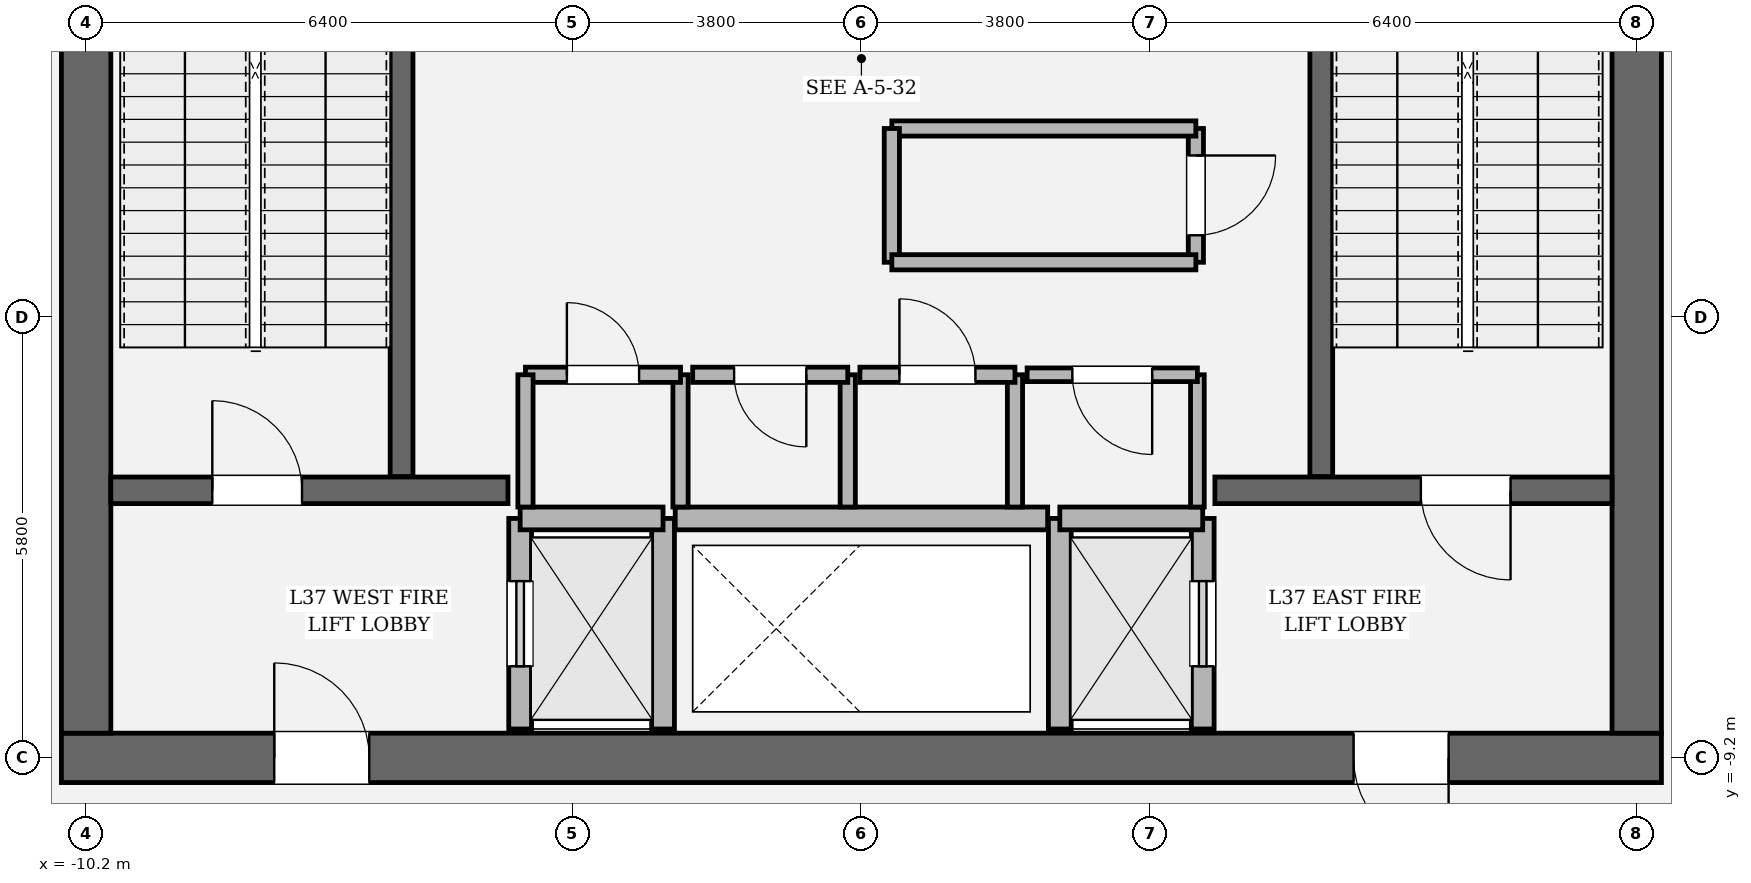
"""IFC4 building model, lengths in metres.
Left out: names, types, materials, properties, quantities, classifications, styles, units other than length and angle.
Written with IfcOpenShell. Run it as: python <this file> out.ifc"""

import sys

from ifc_helpers import new_model, si_unit, direction, frame, frame_2d, origin, place, context, subcontext, project, spatial, rectangle, extrude, element, fill, save


model = new_model("IFC4")
c1 = context("Model", 3, precision=1e-05, world=origin(), true_north=direction((0.0, 1.0)))
c2 = subcontext(c1, "Body", "Model", "MODEL_VIEW")
j1 = project(units=[si_unit("LENGTHUNIT", "METRE"), si_unit("PLANEANGLEUNIT", "RADIAN")], contexts=[c1])
p1 = place(None, origin())
s1 = spatial("IfcSite", under=j1, at=p1, CompositionType="ELEMENT")
p2 = place(p1, origin())
s2 = spatial("IfcBuilding", under=s1, at=p2, CompositionType="ELEMENT")
p3 = place(p2, frame((0.0, 0.0, 160.05)))
s3 = spatial("IfcBuildingStorey", under=s2, at=p3, CompositionType="ELEMENT", Elevation=160.05)
p4 = place(p3, frame((10.525, -9.2, 0.0), z_axis=(0.0, 0.0, 1.0), x_axis=(-1.0, 0.0, 0.0)))
e1 = element("IfcWall", 1, at=p4, inside=s3, PredefinedType="SHEAR", context=c2, shape_type="SweptSolid", body=[
    extrude(rectangle(XDim=21.05, YDim=0.65, at=frame_2d((10.525, 0.0))), origin(), (0.0, 0.0, 1.0), 4.05),
])
p5 = place(p4, frame((2.8, 0.0, 0.0)))
e2 = element("IfcOpeningElement", 2, at=p5, cuts=e1, PredefinedType="OPENING", context=c2, shape_type="SweptSolid", body=[
    extrude(rectangle(XDim=1.25, YDim=2.25, at=frame_2d((0.625, 1.125))), frame((0.0, 0.335, 0.0), z_axis=(0.0, -1.0, 0.0), x_axis=(1.0, 0.0, 0.0)), (0.0, 0.0, 1.0), 0.67),
])
p6 = place(p4, frame((17.0, 0.0, 0.0)))
e3 = element("IfcOpeningElement", 3, at=p6, cuts=e1, PredefinedType="OPENING", context=c2, shape_type="SweptSolid", body=[
    extrude(rectangle(XDim=1.25, YDim=2.25, at=frame_2d((0.625, 1.125))), frame((0.0, 0.335, 0.0), z_axis=(0.0, -1.0, 0.0), x_axis=(1.0, 0.0, 0.0)), (0.0, 0.0, 1.0), 0.67),
])
p7 = place(p3, frame((-10.2, -8.875, 0.0), z_axis=(0.0, 0.0, 1.0), x_axis=(0.0, 1.0, 0.0)))
e4 = element("IfcWall", 4, at=p7, inside=s3, PredefinedType="SHEAR", context=c2, shape_type="SweptSolid", body=[
    extrude(rectangle(XDim=17.75, YDim=0.65, at=frame_2d((8.875, 0.0))), origin(), (0.0, 0.0, 1.0), 4.05),
])
p8 = place(p7, frame((12.665, 0.0, 0.0)))
e5 = element("IfcOpeningElement", 5, at=p8, cuts=e4, PredefinedType="OPENING", context=c2, shape_type="SweptSolid", body=[
    extrude(rectangle(XDim=1.18, YDim=2.2, at=frame_2d((0.59, 1.1))), frame((0.0, 0.335, 0.0), z_axis=(0.0, -1.0, 0.0), x_axis=(1.0, 0.0, 0.0)), (0.0, 0.0, 1.0), 0.67),
])
p9 = place(p3, frame((10.2, 8.875, 0.0), z_axis=(0.0, 0.0, 1.0), x_axis=(0.0, -1.0, 0.0)))
e6 = element("IfcWall", 6, at=p9, inside=s3, PredefinedType="SHEAR", context=c2, shape_type="SweptSolid", body=[
    extrude(rectangle(XDim=17.75, YDim=0.65, at=frame_2d((8.875, 0.0))), origin(), (0.0, 0.0, 1.0), 4.05),
])
p10 = place(p9, frame((3.905, 0.0, 0.0)))
e7 = element("IfcOpeningElement", 7, at=p10, cuts=e6, PredefinedType="OPENING", context=c2, shape_type="SweptSolid", body=[
    extrude(rectangle(XDim=1.18, YDim=2.2, at=frame_2d((0.59, 1.1))), frame((0.0, 0.335, 0.0), z_axis=(0.0, -1.0, 0.0), x_axis=(1.0, 0.0, 0.0)), (0.0, 0.0, 1.0), 0.67),
])
for number, where, z_axis, x_axis in (
    (8, (-6.05, -5.5, 0.0), (0.0, 0.0, 1.0), (0.0, 1.0, 0.0)),
    (9, (6.05, 3.45, 0.0), (0.0, 0.0, 1.0), (0.0, -1.0, 0.0)),
):
    element("IfcWall", number, at=place(p3, frame(where, z_axis=z_axis, x_axis=x_axis)), inside=s3, PredefinedType="SOLIDWALL", context=c2, shape_type="SweptSolid", body=[
        extrude(rectangle(XDim=8.95, YDim=0.3, at=frame_2d((4.475, 0.0))), origin(), (0.0, 0.0, 1.0), 4.05),
    ])
p11 = place(p3, frame((-9.875, -5.68, 0.0), z_axis=(0.0, 0.0, 1.0), x_axis=(1.0, 0.0, 0.0)))
e10 = element("IfcWall", 10, at=p11, inside=s3, PredefinedType="SOLIDWALL", context=c2, shape_type="SweptSolid", body=[
    extrude(rectangle(XDim=5.225, YDim=0.35, at=frame_2d((2.613, 0.0))), origin(), (0.0, 0.0, 1.0), 4.05),
])
p12 = place(p11, frame((1.335, 0.0, 0.0)))
e11 = element("IfcOpeningElement", 11, at=p12, cuts=e10, PredefinedType="OPENING", context=c2, shape_type="SweptSolid", body=[
    extrude(rectangle(XDim=1.18, YDim=2.2, at=frame_2d((0.59, 1.1))), frame((0.0, 0.185, 0.0), z_axis=(0.0, -1.0, 0.0), x_axis=(1.0, 0.0, 0.0)), (0.0, 0.0, 1.0), 0.37),
])
p13 = place(p3, frame((4.65, -5.68, 0.0), z_axis=(0.0, 0.0, 1.0), x_axis=(1.0, 0.0, 0.0)))
e12 = element("IfcWall", 12, at=p13, inside=s3, PredefinedType="SOLIDWALL", context=c2, shape_type="SweptSolid", body=[
    extrude(rectangle(XDim=5.225, YDim=0.35, at=frame_2d((2.613, 0.0))), origin(), (0.0, 0.0, 1.0), 4.05),
])
p14 = place(p13, frame((2.71, 0.0, 0.0)))
e13 = element("IfcOpeningElement", 13, at=p14, cuts=e12, PredefinedType="OPENING", context=c2, shape_type="SweptSolid", body=[
    extrude(rectangle(XDim=1.18, YDim=2.2, at=frame_2d((0.59, 1.1))), frame((0.0, 0.185, 0.0), z_axis=(0.0, -1.0, 0.0), x_axis=(1.0, 0.0, 0.0)), (0.0, 0.0, 1.0), 0.37),
])
p15 = place(p3, frame((-4.49, -8.82, 0.0), z_axis=(0.0, 0.0, 1.0), x_axis=(0.0, 1.0, 0.0)))
e14 = element("IfcWall", 14, at=p15, inside=s3, PredefinedType="SOLIDWALL", context=c2, shape_type="SweptSolid", body=[
    extrude(rectangle(XDim=2.77, YDim=0.3, at=frame_2d((1.385, 0.0))), origin(), (0.0, 0.0, 1.0), 3.83),
])
p16 = place(p15, frame((0.825, 0.0, 0.0)))
e15 = element("IfcOpeningElement", 15, at=p16, cuts=e14, PredefinedType="OPENING", context=c2, shape_type="SweptSolid", body=[
    extrude(rectangle(XDim=1.12, YDim=2.25, at=frame_2d((0.56, 1.125))), frame((0.0, 0.16, 0.0), z_axis=(0.0, -1.0, 0.0), x_axis=(1.0, 0.0, 0.0)), (0.0, 0.0, 1.0), 0.32),
])
p17 = place(p3, frame((-2.61, -8.82, 0.0), z_axis=(0.0, 0.0, 1.0), x_axis=(0.0, 1.0, 0.0)))
e16 = element("IfcWall", 16, at=p17, inside=s3, PredefinedType="SOLIDWALL", context=c2, shape_type="SweptSolid", body=[
    extrude(rectangle(XDim=2.77, YDim=0.3, at=frame_2d((1.385, 0.0))), origin(), (0.0, 0.0, 1.0), 3.83),
])
p18 = place(p3, frame((-4.49, -6.05, 0.0), z_axis=(0.0, 0.0, 1.0), x_axis=(1.0, 0.0, 0.0)))
e17 = element("IfcWall", 17, at=p18, inside=s3, PredefinedType="SOLIDWALL", context=c2, shape_type="SweptSolid", body=[
    extrude(rectangle(XDim=1.88, YDim=0.3, at=frame_2d((0.94, 0.0))), origin(), (0.0, 0.0, 1.0), 3.83),
])
p19 = place(p3, frame((4.49, -8.82, 0.0), z_axis=(0.0, 0.0, 1.0), x_axis=(0.0, 1.0, 0.0)))
e18 = element("IfcWall", 18, at=p19, inside=s3, PredefinedType="SOLIDWALL", context=c2, shape_type="SweptSolid", body=[
    extrude(rectangle(XDim=2.77, YDim=0.3, at=frame_2d((1.385, 0.0))), origin(), (0.0, 0.0, 1.0), 3.83),
])
p20 = place(p19, frame((0.825, 0.0, 0.0)))
e19 = element("IfcOpeningElement", 19, at=p20, cuts=e18, PredefinedType="OPENING", context=c2, shape_type="SweptSolid", body=[
    extrude(rectangle(XDim=1.12, YDim=2.25, at=frame_2d((0.56, 1.125))), frame((0.0, 0.16, 0.0), z_axis=(0.0, -1.0, 0.0), x_axis=(1.0, 0.0, 0.0)), (0.0, 0.0, 1.0), 0.32),
])
p21 = place(p3, frame((2.61, -8.82, 0.0), z_axis=(0.0, 0.0, 1.0), x_axis=(0.0, 1.0, 0.0)))
e20 = element("IfcWall", 20, at=p21, inside=s3, PredefinedType="SOLIDWALL", context=c2, shape_type="SweptSolid", body=[
    extrude(rectangle(XDim=2.77, YDim=0.3, at=frame_2d((1.385, 0.0))), origin(), (0.0, 0.0, 1.0), 3.83),
])
p22 = place(p3, frame((2.61, -6.05, 0.0), z_axis=(0.0, 0.0, 1.0), x_axis=(1.0, 0.0, 0.0)))
e21 = element("IfcWall", 21, at=p22, inside=s3, PredefinedType="SOLIDWALL", context=c2, shape_type="SweptSolid", body=[
    extrude(rectangle(XDim=1.88, YDim=0.3, at=frame_2d((0.94, 0.0))), origin(), (0.0, 0.0, 1.0), 3.83),
])
p23 = place(p3, frame((-2.45, -6.05, 0.0), z_axis=(0.0, 0.0, 1.0), x_axis=(1.0, 0.0, 0.0)))
e22 = element("IfcWall", 22, at=p23, inside=s3, PredefinedType="SOLIDWALL", context=c2, shape_type="SweptSolid", body=[
    extrude(rectangle(XDim=4.9, YDim=0.3, at=frame_2d((2.45, 0.0))), origin(), (0.0, 0.0, 1.0), 3.83),
])
p24 = place(p3, frame((-2.38, -5.9, 0.0), z_axis=(0.0, 0.0, 1.0), x_axis=(0.0, 1.0, 0.0)))
e23 = element("IfcWall", 23, at=p24, inside=s3, PredefinedType="SOLIDWALL", context=c2, shape_type="SweptSolid", body=[
    extrude(rectangle(XDim=1.74, YDim=0.2, at=frame_2d((0.87, 0.0))), origin(), (0.0, 0.0, 1.0), 3.83),
])
p25 = place(p3, frame((-2.38, -4.16, 0.0), z_axis=(0.0, 0.0, 1.0), x_axis=(-1.0, 0.0, 0.0)))
e24 = element("IfcWall", 24, at=p25, inside=s3, PredefinedType="SOLIDWALL", context=c2, shape_type="SweptSolid", body=[
    extrude(rectangle(XDim=2.04, YDim=0.2, at=frame_2d((1.02, 0.0))), origin(), (0.0, 0.0, 1.0), 3.83),
])
p26 = place(p25, frame((0.545, 0.0, 0.0)))
e25 = element("IfcOpeningElement", 25, at=p26, cuts=e24, PredefinedType="OPENING", context=c2, shape_type="SweptSolid", body=[
    extrude(rectangle(XDim=0.95, YDim=2.15, at=frame_2d((0.475, 1.075))), frame((0.0, 0.11, 0.0), z_axis=(0.0, -1.0, 0.0), x_axis=(1.0, 0.0, 0.0)), (0.0, 0.0, 1.0), 0.22),
])
for number, where, z_axis, x_axis in (
    (26, (-4.42, -4.16, 0.0), (0.0, 0.0, 1.0), (0.0, -1.0, 0.0)),
    (27, (-0.18, -5.9, 0.0), (0.0, 0.0, 1.0), (0.0, 1.0, 0.0)),
):
    element("IfcWall", number, at=place(p3, frame(where, z_axis=z_axis, x_axis=x_axis)), inside=s3, PredefinedType="SOLIDWALL", context=c2, shape_type="SweptSolid", body=[
        extrude(rectangle(XDim=1.74, YDim=0.2, at=frame_2d((0.87, 0.0))), origin(), (0.0, 0.0, 1.0), 3.83),
    ])
p27 = place(p3, frame((-0.18, -4.16, 0.0), z_axis=(0.0, 0.0, 1.0), x_axis=(-1.0, 0.0, 0.0)))
e28 = element("IfcWall", 28, at=p27, inside=s3, PredefinedType="SOLIDWALL", context=c2, shape_type="SweptSolid", body=[
    extrude(rectangle(XDim=2.04, YDim=0.2, at=frame_2d((1.02, 0.0))), origin(), (0.0, 0.0, 1.0), 3.83),
])
p28 = place(p27, frame((0.545, 0.0, 0.0)))
e29 = element("IfcOpeningElement", 29, at=p28, cuts=e28, PredefinedType="OPENING", context=c2, shape_type="SweptSolid", body=[
    extrude(rectangle(XDim=0.95, YDim=2.15, at=frame_2d((0.475, 1.075))), frame((0.0, 0.11, 0.0), z_axis=(0.0, -1.0, 0.0), x_axis=(1.0, 0.0, 0.0)), (0.0, 0.0, 1.0), 0.22),
])
p29 = place(p3, frame((2.02, -5.9, 0.0), z_axis=(0.0, 0.0, 1.0), x_axis=(0.0, 1.0, 0.0)))
e30 = element("IfcWall", 30, at=p29, inside=s3, PredefinedType="SOLIDWALL", context=c2, shape_type="SweptSolid", body=[
    extrude(rectangle(XDim=1.74, YDim=0.2, at=frame_2d((0.87, 0.0))), origin(), (0.0, 0.0, 1.0), 3.83),
])
p30 = place(p3, frame((2.02, -4.16, 0.0), z_axis=(0.0, 0.0, 1.0), x_axis=(-1.0, 0.0, 0.0)))
e31 = element("IfcWall", 31, at=p30, inside=s3, PredefinedType="SOLIDWALL", context=c2, shape_type="SweptSolid", body=[
    extrude(rectangle(XDim=2.04, YDim=0.2, at=frame_2d((1.02, 0.0))), origin(), (0.0, 0.0, 1.0), 3.83),
])
p31 = place(p30, frame((0.52, 0.0, 0.0)))
e32 = element("IfcOpeningElement", 32, at=p31, cuts=e31, PredefinedType="OPENING", context=c2, shape_type="SweptSolid", body=[
    extrude(rectangle(XDim=1.0, YDim=2.15, at=frame_2d((0.5, 1.075))), frame((0.0, 0.11, 0.0), z_axis=(0.0, -1.0, 0.0), x_axis=(1.0, 0.0, 0.0)), (0.0, 0.0, 1.0), 0.22),
])
p32 = place(p3, frame((4.42, -5.9, 0.0), z_axis=(0.0, 0.0, 1.0), x_axis=(0.0, 1.0, 0.0)))
e33 = element("IfcWall", 33, at=p32, inside=s3, PredefinedType="PARTITIONING", context=c2, shape_type="SweptSolid", body=[
    extrude(rectangle(XDim=1.74, YDim=0.18, at=frame_2d((0.87, 0.0))), origin(), (0.0, 0.0, 1.0), 3.83),
])
p33 = place(p3, frame((4.42, -4.16, 0.0), z_axis=(0.0, 0.0, 1.0), x_axis=(-1.0, 0.0, 0.0)))
e34 = element("IfcWall", 34, at=p33, inside=s3, PredefinedType="PARTITIONING", context=c2, shape_type="SweptSolid", body=[
    extrude(rectangle(XDim=2.24, YDim=0.18, at=frame_2d((1.12, 0.0))), origin(), (0.0, 0.0, 1.0), 3.83),
])
p34 = place(p33, frame((0.595, 0.0, 0.0)))
e35 = element("IfcOpeningElement", 35, at=p34, cuts=e34, PredefinedType="OPENING", context=c2, shape_type="SweptSolid", body=[
    extrude(rectangle(XDim=1.05, YDim=2.2, at=frame_2d((0.525, 1.1))), frame((0.0, 0.1, 0.0), z_axis=(0.0, -1.0, 0.0), x_axis=(1.0, 0.0, 0.0)), (0.0, 0.0, 1.0), 0.2),
])
p35 = place(p3, frame((4.4, -2.68, 0.0), z_axis=(0.0, 0.0, 1.0), x_axis=(0.0, 1.0, 0.0)))
e36 = element("IfcWall", 36, at=p35, inside=s3, PredefinedType="SOLIDWALL", context=c2, shape_type="SweptSolid", body=[
    extrude(rectangle(XDim=1.76, YDim=0.2, at=frame_2d((0.88, 0.0))), origin(), (0.0, 0.0, 1.0), 3.83),
])
p36 = place(p35, frame((0.355, 0.0, 0.0)))
e37 = element("IfcOpeningElement", 37, at=p36, cuts=e36, PredefinedType="OPENING", context=c2, shape_type="SweptSolid", body=[
    extrude(rectangle(XDim=1.05, YDim=2.2, at=frame_2d((0.525, 1.1))), frame((0.0, 0.11, 0.0), z_axis=(0.0, -1.0, 0.0), x_axis=(1.0, 0.0, 0.0)), (0.0, 0.0, 1.0), 0.22),
])
p37 = place(p3, frame((4.4, -0.92, 0.0), z_axis=(0.0, 0.0, 1.0), x_axis=(-1.0, 0.0, 0.0)))
e38 = element("IfcWall", 38, at=p37, inside=s3, PredefinedType="SOLIDWALL", context=c2, shape_type="SweptSolid", body=[
    extrude(rectangle(XDim=4.0, YDim=0.2, at=frame_2d((2.0, 0.0))), origin(), (0.0, 0.0, 1.0), 3.83),
])
p38 = place(p3, frame((0.4, -0.92, 0.0), z_axis=(0.0, 0.0, 1.0), x_axis=(0.0, -1.0, 0.0)))
e39 = element("IfcWall", 39, at=p38, inside=s3, PredefinedType="SOLIDWALL", context=c2, shape_type="SweptSolid", body=[
    extrude(rectangle(XDim=1.76, YDim=0.2, at=frame_2d((0.88, 0.0))), origin(), (0.0, 0.0, 1.0), 3.83),
])
p39 = place(p3, frame((0.4, -2.68, 0.0), z_axis=(0.0, 0.0, 1.0), x_axis=(1.0, 0.0, 0.0)))
e40 = element("IfcWall", 40, at=p39, inside=s3, PredefinedType="SOLIDWALL", context=c2, shape_type="SweptSolid", body=[
    extrude(rectangle(XDim=4.0, YDim=0.2, at=frame_2d((2.0, 0.0))), origin(), (0.0, 0.0, 1.0), 3.83),
])
p40 = place(p12, origin())
e41 = element("IfcDoor", 41, at=p40, inside=s3, OperationType="SINGLE_SWING_LEFT", PredefinedType="DOOR", context=c2, shape_type="SweptSolid", body=[
    extrude(rectangle(XDim=1.18, YDim=2.2, at=frame_2d((0.59, 1.1))), frame((0.0, 0.025, 0.0), z_axis=(0.0, -1.0, 0.0), x_axis=(1.0, 0.0, 0.0)), (0.0, 0.0, 1.0), 0.05),
])
fill(e11, e41)
p41 = place(p14, origin())
e42 = element("IfcDoor", 42, at=p41, inside=s3, OperationType="SINGLE_SWING_RIGHT", PredefinedType="DOOR", context=c2, shape_type="SweptSolid", body=[
    extrude(rectangle(XDim=1.18, YDim=2.2, at=frame_2d((0.59, 1.1))), frame((0.0, 0.025, 0.0), z_axis=(0.0, -1.0, 0.0), x_axis=(1.0, 0.0, 0.0)), (0.0, 0.0, 1.0), 0.05),
])
fill(e13, e42)
p42 = place(p5, origin())
e43 = element("IfcDoor", 43, at=p42, inside=s3, OperationType="SINGLE_SWING_LEFT", PredefinedType="DOOR", context=c2, shape_type="SweptSolid", body=[
    extrude(rectangle(XDim=1.25, YDim=2.25, at=frame_2d((0.625, 1.125))), frame((0.0, 0.025, 0.0), z_axis=(0.0, -1.0, 0.0), x_axis=(1.0, 0.0, 0.0)), (0.0, 0.0, 1.0), 0.05),
])
fill(e2, e43)
p43 = place(p6, origin())
e44 = element("IfcDoor", 44, at=p43, inside=s3, OperationType="SINGLE_SWING_RIGHT", PredefinedType="DOOR", context=c2, shape_type="SweptSolid", body=[
    extrude(rectangle(XDim=1.25, YDim=2.25, at=frame_2d((0.625, 1.125))), frame((0.0, 0.025, 0.0), z_axis=(0.0, -1.0, 0.0), x_axis=(1.0, 0.0, 0.0)), (0.0, 0.0, 1.0), 0.05),
])
fill(e3, e44)
p44 = place(p16, origin())
e45 = element("IfcDoor", 45, at=p44, inside=s3, OperationType="SLIDING_TO_LEFT", PredefinedType="DOOR", context=c2, shape_type="SweptSolid", body=[
    extrude(rectangle(XDim=1.12, YDim=2.25, at=frame_2d((0.56, 1.125))), frame((0.0, 0.025, 0.0), z_axis=(0.0, -1.0, 0.0), x_axis=(1.0, 0.0, 0.0)), (0.0, 0.0, 1.0), 0.05),
])
fill(e15, e45)
p45 = place(p20, origin())
e46 = element("IfcDoor", 46, at=p45, inside=s3, OperationType="SLIDING_TO_RIGHT", PredefinedType="DOOR", context=c2, shape_type="SweptSolid", body=[
    extrude(rectangle(XDim=1.12, YDim=2.25, at=frame_2d((0.56, 1.125))), frame((0.0, 0.025, 0.0), z_axis=(0.0, -1.0, 0.0), x_axis=(1.0, 0.0, 0.0)), (0.0, 0.0, 1.0), 0.05),
])
fill(e19, e46)
p46 = place(p26, origin())
e47 = element("IfcDoor", 47, at=p46, inside=s3, OperationType="SINGLE_SWING_RIGHT", PredefinedType="DOOR", context=c2, shape_type="SweptSolid", body=[
    extrude(rectangle(XDim=0.95, YDim=2.15, at=frame_2d((0.475, 1.075))), frame((0.0, 0.025, 0.0), z_axis=(0.0, -1.0, 0.0), x_axis=(1.0, 0.0, 0.0)), (0.0, 0.0, 1.0), 0.05),
])
fill(e25, e47)
p47 = place(p28, origin())
e48 = element("IfcDoor", 48, at=p47, inside=s3, OperationType="SINGLE_SWING_LEFT", PredefinedType="DOOR", context=c2, shape_type="SweptSolid", body=[
    extrude(rectangle(XDim=0.95, YDim=2.15, at=frame_2d((0.475, 1.075))), frame((0.0, 0.025, 0.0), z_axis=(0.0, -1.0, 0.0), x_axis=(1.0, 0.0, 0.0)), (0.0, 0.0, 1.0), 0.05),
])
fill(e29, e48)
p48 = place(p31, origin())
e49 = element("IfcDoor", 49, at=p48, inside=s3, OperationType="SINGLE_SWING_RIGHT", PredefinedType="DOOR", context=c2, shape_type="SweptSolid", body=[
    extrude(rectangle(XDim=1.0, YDim=2.15, at=frame_2d((0.5, 1.075))), frame((0.0, 0.025, 0.0), z_axis=(0.0, -1.0, 0.0), x_axis=(1.0, 0.0, 0.0)), (0.0, 0.0, 1.0), 0.05),
])
fill(e32, e49)
p49 = place(p34, origin())
e50 = element("IfcDoor", 50, at=p49, inside=s3, OperationType="SINGLE_SWING_LEFT", PredefinedType="DOOR", context=c2, shape_type="SweptSolid", body=[
    extrude(rectangle(XDim=1.05, YDim=2.2, at=frame_2d((0.525, 1.1))), frame((0.0, 0.025, 0.0), z_axis=(0.0, -1.0, 0.0), x_axis=(1.0, 0.0, 0.0)), (0.0, 0.0, 1.0), 0.05),
])
fill(e35, e50)
p50 = place(p36, origin())
e51 = element("IfcDoor", 51, at=p50, inside=s3, OperationType="SINGLE_SWING_RIGHT", PredefinedType="DOOR", context=c2, shape_type="SweptSolid", body=[
    extrude(rectangle(XDim=1.05, YDim=2.2, at=frame_2d((0.525, 1.1))), frame((0.0, 0.025, 0.0), z_axis=(0.0, -1.0, 0.0), x_axis=(1.0, 0.0, 0.0)), (0.0, 0.0, 1.0), 0.05),
])
fill(e37, e51)
save(model, sys.argv[1])
